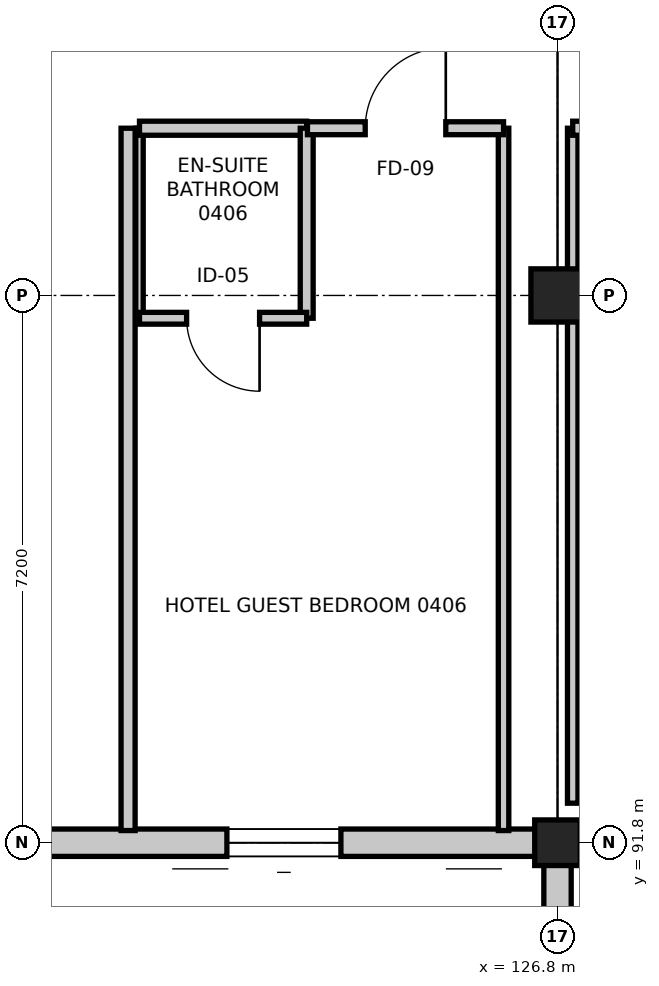
"""IFC4 building model, lengths in metres.
Left out: names, types, materials, properties, quantities, classifications, styles, units other than length and angle.
Written with IfcOpenShell. Run it as: python <this file> out.ifc"""

import sys

from ifc_helpers import new_model, si_unit, direction, frame, frame_2d, origin, origin_2d, place, context, subcontext, project, spatial, rectangle, extrude, element, fill, save


model = new_model("IFC4")
c1 = context("Model", 3, precision=1e-05, world=origin(), true_north=direction((0.0, 1.0)))
c2 = subcontext(c1, "Body", "Model", "MODEL_VIEW")
j1 = project(units=[si_unit("LENGTHUNIT", "METRE"), si_unit("PLANEANGLEUNIT", "RADIAN")], contexts=[c1])
p1 = place(None, origin())
s1 = spatial("IfcSite", under=j1, at=p1, CompositionType="ELEMENT")
p2 = place(p1, origin())
s2 = spatial("IfcBuilding", under=s1, at=p2, CompositionType="ELEMENT")
p3 = place(p2, frame((0.0, 0.0, 19.2)))
s3 = spatial("IfcBuildingStorey", under=s2, at=p3, CompositionType="ELEMENT", Elevation=19.2)
p4 = place(p3, frame((126.8, 91.8, 0.0), z_axis=(0.0, 0.0, 1.0), x_axis=(1.0, 0.0, 0.0)))
e1 = element("IfcColumn", 1, at=p4, inside=s3, PredefinedType="COLUMN", context=c2, shape_type="SweptSolid", body=[
    extrude(rectangle(XDim=0.6, YDim=0.6, at=origin_2d()), origin(), (0.0, 0.0, 1.0), 3.6),
])
p5 = place(p3, frame((126.8, 99.0, 0.0), z_axis=(0.0, 0.0, 1.0), x_axis=(1.0, 0.0, 0.0)))
e2 = element("IfcColumn", 2, at=p5, inside=s3, PredefinedType="COLUMN", context=c2, shape_type="SweptSolid", body=[
    extrude(rectangle(XDim=0.7, YDim=0.7, at=origin_2d()), origin(), (0.0, 0.0, 1.0), 3.6),
])
p6 = place(p3, frame((126.8, 84.6, 0.0), z_axis=(0.0, 0.0, 1.0), x_axis=(0.0, 1.0, 0.0)))
e3 = element("IfcWall", 3, at=p6, inside=s3, PredefinedType="STANDARD", context=c2, shape_type="SweptSolid", body=[
    extrude(rectangle(XDim=7.2, YDim=0.36, at=frame_2d((3.6, 0.0))), origin(), (0.0, 0.0, 1.0), 2.926),
])
p7 = place(p6, frame((3.0, 0.0, 0.75)))
e4 = element("IfcOpeningElement", 4, at=p7, cuts=e3, PredefinedType="OPENING", context=c2, shape_type="SweptSolid", body=[
    extrude(rectangle(XDim=1.2, YDim=1.8, at=frame_2d((0.6, 0.9))), frame((0.0, 0.19, 0.0), z_axis=(0.0, -1.0, 0.0), x_axis=(1.0, 0.0, 0.0)), (0.0, 0.0, 1.0), 0.38),
])
p8 = place(p3, frame((126.8, 91.8, 0.0), z_axis=(0.0, 0.0, 1.0), x_axis=(-1.0, 0.0, 0.0)))
e5 = element("IfcWall", 5, at=p8, inside=s3, PredefinedType="STANDARD", context=c2, shape_type="SweptSolid", body=[
    extrude(rectangle(XDim=7.2, YDim=0.36, at=frame_2d((3.6, 0.0))), origin(), (0.0, 0.0, 1.0), 2.735),
])
p9 = place(p8, frame((2.85, 0.0, 0.75)))
e6 = element("IfcOpeningElement", 6, at=p9, cuts=e5, PredefinedType="OPENING", context=c2, shape_type="SweptSolid", body=[
    extrude(rectangle(XDim=1.5, YDim=1.5, at=frame_2d((0.75, 0.75))), frame((0.0, 0.19, 0.0), z_axis=(0.0, -1.0, 0.0), x_axis=(1.0, 0.0, 0.0)), (0.0, 0.0, 1.0), 0.38),
])
p10 = place(p3, frame((127.0, 92.32, 0.0), z_axis=(0.0, 0.0, 1.0), x_axis=(0.0, 1.0, 0.0)))
e7 = element("IfcWall", 7, at=p10, inside=s3, PredefinedType="PARTITIONING", context=c2, shape_type="SweptSolid", body=[
    extrude(rectangle(XDim=8.88, YDim=0.138, at=frame_2d((4.44, 0.0))), origin(), (0.0, 0.0, 1.0), 2.685),
])
p11 = place(p3, frame((127.0, 101.2, 0.0), z_axis=(0.0, 0.0, 1.0), x_axis=(1.0, 0.0, 0.0)))
e8 = element("IfcWall", 8, at=p11, inside=s3, PredefinedType="PARTITIONING", context=c2, shape_type="SweptSolid", body=[
    extrude(rectangle(XDim=8.19, YDim=0.185, at=frame_2d((4.095, 0.0))), origin(), (0.0, 0.0, 1.0), 2.685),
])
p12 = place(p3, frame((121.3, 98.7, 0.0), z_axis=(0.0, 0.0, 1.0), x_axis=(0.0, 1.0, 0.0)))
e9 = element("IfcWall", 9, at=p12, inside=s3, PredefinedType="PARTITIONING", context=c2, shape_type="SweptSolid", body=[
    extrude(rectangle(XDim=2.5, YDim=0.098, at=frame_2d((1.25, 0.0))), origin(), (0.0, 0.0, 1.0), 2.735),
])
p13 = place(p3, frame((121.3, 101.2, 0.0), z_axis=(0.0, 0.0, 1.0), x_axis=(1.0, 0.0, 0.0)))
e10 = element("IfcWall", 10, at=p13, inside=s3, PredefinedType="PARTITIONING", context=c2, shape_type="SweptSolid", body=[
    extrude(rectangle(XDim=2.2, YDim=0.185, at=frame_2d((1.1, 0.0))), origin(), (0.0, 0.0, 1.0), 3.35),
])
p14 = place(p3, frame((123.5, 101.2, 0.0), z_axis=(0.0, 0.0, 1.0), x_axis=(0.0, -1.0, 0.0)))
e11 = element("IfcWall", 11, at=p14, inside=s3, PredefinedType="PARTITIONING", context=c2, shape_type="SweptSolid", body=[
    extrude(rectangle(XDim=2.5, YDim=0.17, at=frame_2d((1.25, 0.0))), origin(), (0.0, 0.0, 1.0), 2.735),
])
p15 = place(p3, frame((123.5, 98.7, 0.0), z_axis=(0.0, 0.0, 1.0), x_axis=(-1.0, 0.0, 0.0)))
e12 = element("IfcWall", 12, at=p15, inside=s3, PredefinedType="PARTITIONING", context=c2, shape_type="SweptSolid", body=[
    extrude(rectangle(XDim=2.2, YDim=0.155, at=frame_2d((1.1, 0.0))), origin(), (0.0, 0.0, 1.0), 3.35),
])
p16 = place(p15, frame((0.62, 0.0, 0.0)))
e13 = element("IfcOpeningElement", 13, at=p16, cuts=e12, PredefinedType="OPENING", context=c2, shape_type="SweptSolid", body=[
    extrude(rectangle(XDim=0.96, YDim=2.14, at=frame_2d((0.48, 1.07))), frame((0.0, 0.087, 0.0), z_axis=(0.0, -1.0, 0.0), x_axis=(1.0, 0.0, 0.0)), (0.0, 0.0, 1.0), 0.175),
])
p17 = place(p3, frame((126.09, 101.2, 0.0), z_axis=(0.0, 0.0, 1.0), x_axis=(0.0, -1.0, 0.0)))
e14 = element("IfcWall", 14, at=p17, inside=s3, PredefinedType="PARTITIONING", context=c2, shape_type="SweptSolid", body=[
    extrude(rectangle(XDim=9.24, YDim=0.138, at=frame_2d((4.62, 0.0))), origin(), (0.0, 0.0, 1.0), 2.735),
])
p18 = place(p3, frame((121.15, 91.96, 0.0), z_axis=(0.0, 0.0, 1.0), x_axis=(0.0, 1.0, 0.0)))
e15 = element("IfcWall", 15, at=p18, inside=s3, PredefinedType="PARTITIONING", context=c2, shape_type="SweptSolid", body=[
    extrude(rectangle(XDim=9.24, YDim=0.185, at=frame_2d((4.62, 0.0))), origin(), (0.0, 0.0, 1.0), 2.735),
])
p19 = place(p3, frame((123.51, 101.2, 0.0), z_axis=(0.0, 0.0, 1.0), x_axis=(1.0, 0.0, 0.0)))
e16 = element("IfcWall", 16, at=p19, inside=s3, PredefinedType="PARTITIONING", context=c2, shape_type="SweptSolid", body=[
    extrude(rectangle(XDim=2.58, YDim=0.17, at=frame_2d((1.29, 0.0))), origin(), (0.0, 0.0, 1.0), 3.35),
])
p20 = place(p19, frame((0.76, 0.0, 0.0)))
e17 = element("IfcOpeningElement", 17, at=p20, cuts=e16, PredefinedType="OPENING", context=c2, shape_type="SweptSolid", body=[
    extrude(rectangle(XDim=1.06, YDim=2.2, at=frame_2d((0.53, 1.1))), frame((0.0, 0.095, 0.0), z_axis=(0.0, -1.0, 0.0), x_axis=(1.0, 0.0, 0.0)), (0.0, 0.0, 1.0), 0.19),
])
p21 = place(p9, origin())
e18 = element("IfcWindow", 18, at=p21, inside=s3, PartitioningType="SINGLE_PANEL", PredefinedType="WINDOW", context=c2, shape_type="SweptSolid", body=[
    extrude(rectangle(XDim=1.5, YDim=1.5, at=frame_2d((0.75, 0.75))), frame((0.0, 0.03, 0.0), z_axis=(0.0, -1.0, 0.0), x_axis=(1.0, 0.0, 0.0)), (0.0, 0.0, 1.0), 0.06),
])
fill(e6, e18)
p22 = place(p16, origin())
e19 = element("IfcDoor", 19, at=p22, inside=s3, OperationType="SINGLE_SWING_LEFT", PredefinedType="DOOR", context=c2, shape_type="SweptSolid", body=[
    extrude(rectangle(XDim=0.96, YDim=2.14, at=frame_2d((0.48, 1.07))), frame((0.0, 0.025, 0.0), z_axis=(0.0, -1.0, 0.0), x_axis=(1.0, 0.0, 0.0)), (0.0, 0.0, 1.0), 0.05),
])
fill(e13, e19)
p23 = place(p20, origin())
e20 = element("IfcDoor", 20, at=p23, inside=s3, OperationType="SINGLE_SWING_RIGHT", PredefinedType="DOOR", context=c2, shape_type="SweptSolid", body=[
    extrude(rectangle(XDim=1.06, YDim=2.2, at=frame_2d((0.53, 1.1))), frame((0.0, 0.025, 0.0), z_axis=(0.0, -1.0, 0.0), x_axis=(1.0, 0.0, 0.0)), (0.0, 0.0, 1.0), 0.05),
])
fill(e17, e20)
save(model, sys.argv[1])
